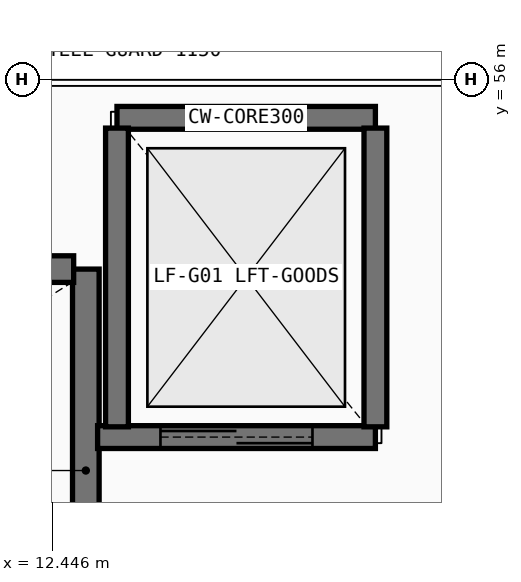
"""IFC4 building model, lengths in metres.
Left out: names, types, materials, properties, quantities, classifications, styles, units other than length and angle.
Written with IfcOpenShell. Run it as: python <this file> out.ifc"""

import sys

from ifc_helpers import new_model, si_unit, direction, frame, frame_2d, origin, place, context, subcontext, project, spatial, rectangle, extrude, element, fill, save


model = new_model("IFC4")
c1 = context("Model", 3, precision=1e-05, world=origin(), true_north=direction((0.0, 1.0)))
c2 = subcontext(c1, "Body", "Model", "MODEL_VIEW")
j1 = project(units=[si_unit("LENGTHUNIT", "METRE"), si_unit("PLANEANGLEUNIT", "RADIAN")], contexts=[c1])
p1 = place(None, origin())
s1 = spatial("IfcSite", under=j1, at=p1, CompositionType="ELEMENT")
p2 = place(p1, origin())
s2 = spatial("IfcBuilding", under=s1, at=p2, CompositionType="ELEMENT")
p3 = place(p2, frame((0.0, 0.0, 11.4)))
s3 = spatial("IfcBuildingStorey", under=s2, at=p3, CompositionType="ELEMENT", Elevation=11.4)
p4 = place(p3, frame((12.89, 48.21, 0.0), z_axis=(0.0, 0.0, 1.0), x_axis=(0.0, 1.0, 0.0)))
e1 = element("IfcWall", 1, at=p4, inside=s3, PredefinedType="SHEAR", context=c2, shape_type="SweptSolid", body=[
    extrude(rectangle(XDim=5.3, YDim=0.35, at=frame_2d((2.65, 0.0))), origin(), (0.0, 0.0, 1.0), 4.27),
])
p5 = place(p3, frame((12.73, 53.51, 0.0), z_axis=(0.0, 0.0, 1.0), x_axis=(-1.0, 0.0, 0.0)))
e2 = element("IfcWall", 2, at=p5, inside=s3, PredefinedType="SHEAR", context=c2, shape_type="SweptSolid", body=[
    extrude(rectangle(XDim=10.88, YDim=0.35, at=frame_2d((5.44, 0.0))), origin(), (0.0, 0.0, 1.0), 4.27),
])
p6 = place(p3, frame((16.7, 55.5, 0.0), z_axis=(0.0, 0.0, 1.0), x_axis=(-1.0, 0.0, 0.0)))
e3 = element("IfcWall", 3, at=p6, inside=s3, PredefinedType="SHEAR", context=c2, shape_type="SweptSolid", body=[
    extrude(rectangle(XDim=3.4, YDim=0.3, at=frame_2d((1.7, 0.0))), origin(), (0.0, 0.0, 1.0), 4.27),
])
p7 = place(p3, frame((13.045, 51.3, 0.0), z_axis=(0.0, 0.0, 1.0), x_axis=(1.0, 0.0, 0.0)))
e4 = element("IfcWall", 4, at=p7, inside=s3, PredefinedType="SHEAR", context=c2, shape_type="SweptSolid", body=[
    extrude(rectangle(XDim=3.655, YDim=0.3, at=frame_2d((1.828, 0.0))), origin(), (0.0, 0.0, 1.0), 4.27),
])
p8 = place(p7, frame((0.827, 0.0, 0.0)))
e5 = element("IfcOpeningElement", 5, at=p8, cuts=e4, PredefinedType="OPENING", context=c2, shape_type="SweptSolid", body=[
    extrude(rectangle(XDim=2.0, YDim=2.5, at=frame_2d((1.0, 1.25))), frame((0.0, 0.16, 0.0), z_axis=(0.0, -1.0, 0.0), x_axis=(1.0, 0.0, 0.0)), (0.0, 0.0, 1.0), 0.32),
])
for number, where, z_axis, x_axis in (
    (6, (16.7, 51.435, 0.0), (0.0, 0.0, 1.0), (0.0, 1.0, 0.0)),
    (7, (13.3, 55.365, 0.0), (0.0, 0.0, 1.0), (0.0, -1.0, 0.0)),
):
    element("IfcWall", number, at=place(p3, frame(where, z_axis=z_axis, x_axis=x_axis)), inside=s3, PredefinedType="SHEAR", context=c2, shape_type="SweptSolid", body=[
        extrude(rectangle(XDim=3.93, YDim=0.3, at=frame_2d((1.965, 0.0))), origin(), (0.0, 0.0, 1.0), 4.27),
    ])
p9 = place(p8, origin())
e8 = element("IfcDoor", 8, at=p9, inside=s3, OperationType="DOUBLE_DOOR_SLIDING", PredefinedType="DOOR", context=c2, shape_type="SweptSolid", body=[
    extrude(rectangle(XDim=2.0, YDim=2.5, at=frame_2d((1.0, 1.25))), frame((0.0, 0.025, 0.0), z_axis=(0.0, -1.0, 0.0), x_axis=(1.0, 0.0, 0.0)), (0.0, 0.0, 1.0), 0.05),
])
fill(e5, e8)
save(model, sys.argv[1])
